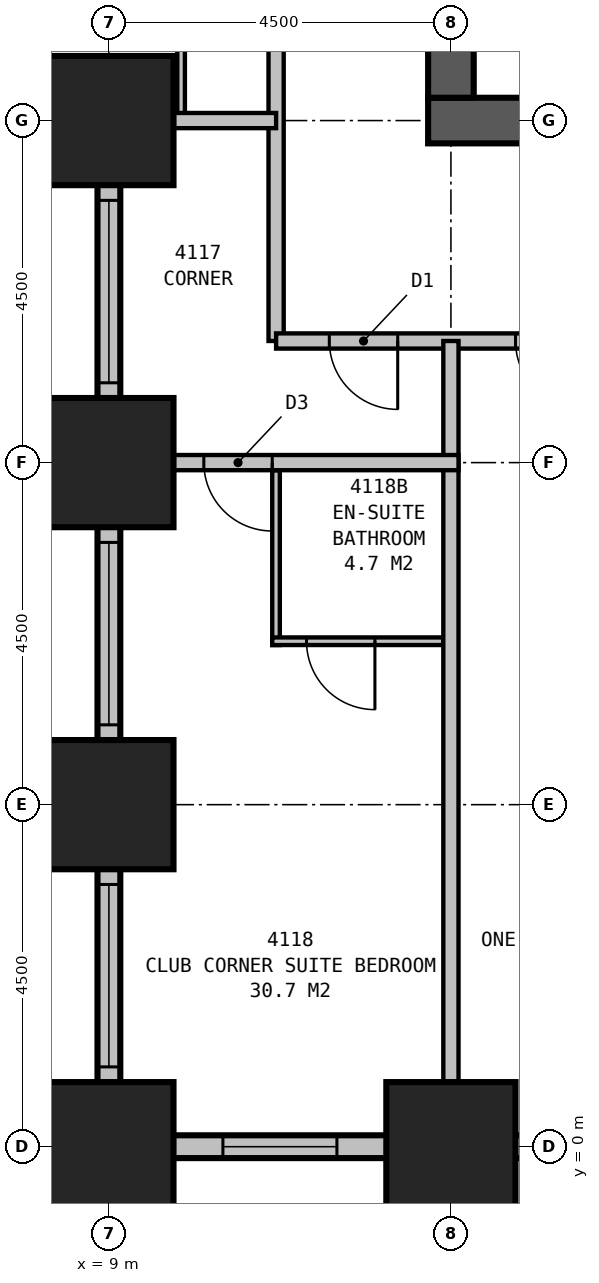
"""IFC4 building model, lengths in metres.
Left out: names, types, materials, properties, quantities, classifications, styles, units other than length and angle.
Written with IfcOpenShell. Run it as: python <this file> out.ifc"""

import sys

from ifc_helpers import new_model, si_unit, direction, frame, frame_2d, origin, origin_2d, place, context, subcontext, project, spatial, rectangle, extrude, element, fill, save


model = new_model("IFC4")
c1 = context("Model", 3, precision=1e-05, world=origin(), true_north=direction((0.0, 1.0)))
c2 = subcontext(c1, "Body", "Model", "MODEL_VIEW")
j1 = project(units=[si_unit("LENGTHUNIT", "METRE"), si_unit("PLANEANGLEUNIT", "RADIAN")], contexts=[c1])
p1 = place(None, origin())
s1 = spatial("IfcSite", under=j1, at=p1, CompositionType="ELEMENT")
p2 = place(p1, origin())
s2 = spatial("IfcBuilding", under=s1, at=p2, CompositionType="ELEMENT")
p3 = place(p2, frame((0.0, 0.0, 162.4)))
s3 = spatial("IfcBuildingStorey", under=s2, at=p3, CompositionType="ELEMENT", Elevation=162.4)
for number, where, z_axis, x_axis in (
    (1, (9.0, 13.5, 0.0), (0.0, 0.0, 1.0), (1.0, 0.0, 0.0)),
    (2, (9.0, 9.0, 0.0), (0.0, 0.0, 1.0), (1.0, 0.0, 0.0)),
    (3, (9.0, 4.5, 0.0), (0.0, 0.0, 1.0), (1.0, 0.0, 0.0)),
    (4, (9.0, 0.0, 0.0), (0.0, 0.0, 1.0), (1.0, 0.0, 0.0)),
    (5, (13.5, 0.0, 0.0), (0.0, 0.0, 1.0), (1.0, 0.0, 0.0)),
):
    element("IfcColumn", number, at=place(p3, frame(where, z_axis=z_axis, x_axis=x_axis)), inside=s3, PredefinedType="COLUMN", context=c2, shape_type="SweptSolid", body=[
        extrude(rectangle(XDim=1.7, YDim=1.7, at=origin_2d()), origin(), (0.0, 0.0, 1.0), 3.5),
    ])
p4 = place(p3, frame((13.2, 13.5, 0.0), z_axis=(0.0, 0.0, 1.0), x_axis=(1.0, 0.0, 0.0)))
e6 = element("IfcWall", 6, at=p4, inside=s3, PredefinedType="SHEAR", context=c2, shape_type="SweptSolid", body=[
    extrude(rectangle(XDim=23.1, YDim=0.6, at=frame_2d((11.55, 0.0))), origin(), (0.0, 0.0, 1.0), 3.5),
])
p5 = place(p3, frame((13.5, 16.5, 0.0), z_axis=(0.0, 0.0, 1.0), x_axis=(0.0, -1.0, 0.0)))
e7 = element("IfcWall", 7, at=p5, inside=s3, PredefinedType="SHEAR", context=c2, shape_type="SweptSolid", body=[
    extrude(rectangle(XDim=2.7, YDim=0.6, at=frame_2d((1.35, 0.0))), origin(), (0.0, 0.0, 1.0), 3.5),
])
p6 = place(p3, frame((1.35, 13.5, 0.0), z_axis=(0.0, 0.0, 1.0), x_axis=(1.0, 0.0, 0.0)))
e8 = element("IfcWall", 8, at=p6, inside=s3, PredefinedType="STANDARD", context=c2, shape_type="SweptSolid", body=[
    extrude(rectangle(XDim=7.8, YDim=0.3, at=frame_2d((3.9, 0.0))), origin(), (0.0, 0.0, 1.0), 2.0),
])
p7 = place(p6, frame((1.2, 0.0, 0.5)))
e9 = element("IfcOpeningElement", 9, at=p7, cuts=e8, PredefinedType="OPENING", context=c2, shape_type="SweptSolid", body=[
    extrude(rectangle(XDim=0.9, YDim=1.35, at=frame_2d((0.45, 0.675))), frame((0.0, 0.16, 0.0), z_axis=(0.0, -1.0, 0.0), x_axis=(1.0, 0.0, 0.0)), (0.0, 0.0, 1.0), 0.32),
])
p8 = place(p3, frame((9.0, 13.65, 0.0), z_axis=(0.0, 0.0, 1.0), x_axis=(0.0, -1.0, 0.0)))
e10 = element("IfcWall", 10, at=p8, inside=s3, PredefinedType="STANDARD", context=c2, shape_type="SweptSolid", body=[
    extrude(rectangle(XDim=13.8, YDim=0.3, at=frame_2d((6.9, 0.0))), origin(), (0.0, 0.0, 1.0), 2.0),
])
p9 = place(p8, frame((1.2, 0.0, 0.5)))
e11 = element("IfcOpeningElement", 11, at=p9, cuts=e10, PredefinedType="OPENING", context=c2, shape_type="SweptSolid", body=[
    extrude(rectangle(XDim=2.4, YDim=1.35, at=frame_2d((1.2, 0.675))), frame((0.0, 0.16, 0.0), z_axis=(0.0, -1.0, 0.0), x_axis=(1.0, 0.0, 0.0)), (0.0, 0.0, 1.0), 0.32),
])
p10 = place(p8, frame((5.7, 0.0, 0.5)))
e12 = element("IfcOpeningElement", 12, at=p10, cuts=e10, PredefinedType="OPENING", context=c2, shape_type="SweptSolid", body=[
    extrude(rectangle(XDim=2.4, YDim=1.35, at=frame_2d((1.2, 0.675))), frame((0.0, 0.16, 0.0), z_axis=(0.0, -1.0, 0.0), x_axis=(1.0, 0.0, 0.0)), (0.0, 0.0, 1.0), 0.32),
])
p11 = place(p8, frame((10.2, 0.0, 0.5)))
e13 = element("IfcOpeningElement", 13, at=p11, cuts=e10, PredefinedType="OPENING", context=c2, shape_type="SweptSolid", body=[
    extrude(rectangle(XDim=2.4, YDim=1.35, at=frame_2d((1.2, 0.675))), frame((0.0, 0.16, 0.0), z_axis=(0.0, -1.0, 0.0), x_axis=(1.0, 0.0, 0.0)), (0.0, 0.0, 1.0), 0.32),
])
p12 = place(p3, frame((8.85, 0.0, 0.0), z_axis=(0.0, 0.0, 1.0), x_axis=(1.0, 0.0, 0.0)))
e14 = element("IfcWall", 14, at=p12, inside=s3, PredefinedType="STANDARD", context=c2, shape_type="SweptSolid", body=[
    extrude(rectangle(XDim=36.3, YDim=0.3, at=frame_2d((18.15, 0.0))), origin(), (0.0, 0.0, 1.0), 2.25),
])
p13 = place(p12, frame((1.65, 0.0, 0.5)))
e15 = element("IfcOpeningElement", 15, at=p13, cuts=e14, PredefinedType="OPENING", context=c2, shape_type="SweptSolid", body=[
    extrude(rectangle(XDim=1.5, YDim=1.6, at=frame_2d((0.75, 0.8))), frame((0.0, 0.16, 0.0), z_axis=(0.0, -1.0, 0.0), x_axis=(1.0, 0.0, 0.0)), (0.0, 0.0, 1.0), 0.32),
])
p14 = place(p12, frame((5.7, 0.0, 0.5)))
e16 = element("IfcOpeningElement", 16, at=p14, cuts=e14, PredefinedType="OPENING", context=c2, shape_type="SweptSolid", body=[
    extrude(rectangle(XDim=2.4, YDim=1.6, at=frame_2d((1.2, 0.8))), frame((0.0, 0.16, 0.0), z_axis=(0.0, -1.0, 0.0), x_axis=(1.0, 0.0, 0.0)), (0.0, 0.0, 1.0), 0.32),
])
p15 = place(p12, frame((10.2, 0.0, 0.5)))
e17 = element("IfcOpeningElement", 17, at=p15, cuts=e14, PredefinedType="OPENING", context=c2, shape_type="SweptSolid", body=[
    extrude(rectangle(XDim=2.4, YDim=1.6, at=frame_2d((1.2, 0.8))), frame((0.0, 0.16, 0.0), z_axis=(0.0, -1.0, 0.0), x_axis=(1.0, 0.0, 0.0)), (0.0, 0.0, 1.0), 0.32),
])
p16 = place(p12, frame((14.7, 0.0, 0.5)))
e18 = element("IfcOpeningElement", 18, at=p16, cuts=e14, PredefinedType="OPENING", context=c2, shape_type="SweptSolid", body=[
    extrude(rectangle(XDim=2.4, YDim=1.6, at=frame_2d((1.2, 0.8))), frame((0.0, 0.16, 0.0), z_axis=(0.0, -1.0, 0.0), x_axis=(1.0, 0.0, 0.0)), (0.0, 0.0, 1.0), 0.32),
])
p17 = place(p12, frame((19.2, 0.0, 0.5)))
e19 = element("IfcOpeningElement", 19, at=p17, cuts=e14, PredefinedType="OPENING", context=c2, shape_type="SweptSolid", body=[
    extrude(rectangle(XDim=2.4, YDim=1.6, at=frame_2d((1.2, 0.8))), frame((0.0, 0.16, 0.0), z_axis=(0.0, -1.0, 0.0), x_axis=(1.0, 0.0, 0.0)), (0.0, 0.0, 1.0), 0.32),
])
p18 = place(p12, frame((23.7, 0.0, 0.5)))
e20 = element("IfcOpeningElement", 20, at=p18, cuts=e14, PredefinedType="OPENING", context=c2, shape_type="SweptSolid", body=[
    extrude(rectangle(XDim=2.4, YDim=1.6, at=frame_2d((1.2, 0.8))), frame((0.0, 0.16, 0.0), z_axis=(0.0, -1.0, 0.0), x_axis=(1.0, 0.0, 0.0)), (0.0, 0.0, 1.0), 0.32),
])
p19 = place(p12, frame((28.2, 0.0, 0.5)))
e21 = element("IfcOpeningElement", 21, at=p19, cuts=e14, PredefinedType="OPENING", context=c2, shape_type="SweptSolid", body=[
    extrude(rectangle(XDim=2.4, YDim=1.6, at=frame_2d((1.2, 0.8))), frame((0.0, 0.16, 0.0), z_axis=(0.0, -1.0, 0.0), x_axis=(1.0, 0.0, 0.0)), (0.0, 0.0, 1.0), 0.32),
])
p20 = place(p12, frame((32.7, 0.0, 0.5)))
e22 = element("IfcOpeningElement", 22, at=p20, cuts=e14, PredefinedType="OPENING", context=c2, shape_type="SweptSolid", body=[
    extrude(rectangle(XDim=2.4, YDim=1.6, at=frame_2d((1.2, 0.8))), frame((0.0, 0.16, 0.0), z_axis=(0.0, -1.0, 0.0), x_axis=(1.0, 0.0, 0.0)), (0.0, 0.0, 1.0), 0.32),
])
p21 = place(p3, frame((11.2, 10.6, 0.0), z_axis=(0.0, 0.0, 1.0), x_axis=(1.0, 0.0, 0.0)))
e23 = element("IfcWall", 23, at=p21, inside=s3, PredefinedType="PARTITIONING", context=c2, shape_type="SweptSolid", body=[
    extrude(rectangle(XDim=27.1, YDim=0.2, at=frame_2d((13.55, 0.0))), origin(), (0.0, 0.0, 1.0), 3.25),
])
p22 = place(p21, frame((4.05, 0.0, 0.0), z_axis=(0.0, 0.0, 1.0), x_axis=(-1.0, 0.0, 0.0)))
e24 = element("IfcOpeningElement", 24, at=p22, cuts=e23, PredefinedType="OPENING", context=c2, shape_type="SweptSolid", body=[
    extrude(rectangle(XDim=0.9, YDim=2.1, at=frame_2d((0.45, 1.05))), frame((0.0, 0.11, 0.0), z_axis=(0.0, -1.0, 0.0), x_axis=(1.0, 0.0, 0.0)), (0.0, 0.0, 1.0), 0.22),
])
p23 = place(p21, frame((12.65, 0.0, 0.0), z_axis=(0.0, 0.0, 1.0), x_axis=(-1.0, 0.0, 0.0)))
e25 = element("IfcOpeningElement", 25, at=p23, cuts=e23, PredefinedType="OPENING", context=c2, shape_type="SweptSolid", body=[
    extrude(rectangle(XDim=1.0, YDim=2.1, at=frame_2d((0.5, 1.05))), frame((0.0, 0.11, 0.0), z_axis=(0.0, -1.0, 0.0), x_axis=(1.0, 0.0, 0.0)), (0.0, 0.0, 1.0), 0.22),
])
p24 = place(p21, frame((17.55, 0.0, 0.0), z_axis=(0.0, 0.0, 1.0), x_axis=(-1.0, 0.0, 0.0)))
e26 = element("IfcOpeningElement", 26, at=p24, cuts=e23, PredefinedType="OPENING", context=c2, shape_type="SweptSolid", body=[
    extrude(rectangle(XDim=0.9, YDim=2.1, at=frame_2d((0.45, 1.05))), frame((0.0, 0.11, 0.0), z_axis=(0.0, -1.0, 0.0), x_axis=(1.0, 0.0, 0.0)), (0.0, 0.0, 1.0), 0.22),
])
p25 = place(p21, frame((1.6, 0.0, 0.0), z_axis=(0.0, 0.0, 1.0), x_axis=(-1.0, 0.0, 0.0)))
e27 = element("IfcOpeningElement", 27, at=p25, cuts=e23, PredefinedType="OPENING", context=c2, shape_type="SweptSolid", body=[
    extrude(rectangle(XDim=0.9, YDim=2.1, at=frame_2d((0.45, 1.05))), frame((0.0, 0.11, 0.0), z_axis=(0.0, -1.0, 0.0), x_axis=(1.0, 0.0, 0.0)), (0.0, 0.0, 1.0), 0.22),
])
p26 = place(p21, frame((26.4, 0.0, 0.0), z_axis=(0.0, 0.0, 1.0), x_axis=(-1.0, 0.0, 0.0)))
e28 = element("IfcOpeningElement", 28, at=p26, cuts=e23, PredefinedType="OPENING", context=c2, shape_type="SweptSolid", body=[
    extrude(rectangle(XDim=0.9, YDim=2.1, at=frame_2d((0.45, 1.05))), frame((0.0, 0.11, 0.0), z_axis=(0.0, -1.0, 0.0), x_axis=(1.0, 0.0, 0.0)), (0.0, 0.0, 1.0), 0.22),
])
p27 = place(p3, frame((11.2, 10.6, 0.0), z_axis=(0.0, 0.0, 1.0), x_axis=(0.0, 1.0, 0.0)))
e29 = element("IfcWall", 29, at=p27, inside=s3, PredefinedType="PARTITIONING", context=c2, shape_type="SweptSolid", body=[
    extrude(rectangle(XDim=18.7, YDim=0.2, at=frame_2d((9.35, 0.0))), origin(), (0.0, 0.0, 1.0), 3.25),
])
p28 = place(p27, frame((6.05, 0.0, 0.0)))
e30 = element("IfcOpeningElement", 30, at=p28, cuts=e29, PredefinedType="OPENING", context=c2, shape_type="SweptSolid", body=[
    extrude(rectangle(XDim=0.9, YDim=2.1, at=frame_2d((0.45, 1.05))), frame((0.0, 0.11, 0.0), z_axis=(0.0, -1.0, 0.0), x_axis=(1.0, 0.0, 0.0)), (0.0, 0.0, 1.0), 0.22),
])
p29 = place(p27, frame((10.55, 0.0, 0.0)))
e31 = element("IfcOpeningElement", 31, at=p29, cuts=e29, PredefinedType="OPENING", context=c2, shape_type="SweptSolid", body=[
    extrude(rectangle(XDim=0.9, YDim=2.1, at=frame_2d((0.45, 1.05))), frame((0.0, 0.11, 0.0), z_axis=(0.0, -1.0, 0.0), x_axis=(1.0, 0.0, 0.0)), (0.0, 0.0, 1.0), 0.22),
])
p30 = place(p27, frame((14.65, 0.0, 0.0)))
e32 = element("IfcOpeningElement", 32, at=p30, cuts=e29, PredefinedType="OPENING", context=c2, shape_type="SweptSolid", body=[
    extrude(rectangle(XDim=1.0, YDim=2.1, at=frame_2d((0.5, 1.05))), frame((0.0, 0.11, 0.0), z_axis=(0.0, -1.0, 0.0), x_axis=(1.0, 0.0, 0.0)), (0.0, 0.0, 1.0), 0.22),
])
p31 = place(p3, frame((9.95, 13.5, 0.0), z_axis=(0.0, 0.0, 1.0), x_axis=(0.0, 1.0, 0.0)))
e33 = element("IfcWall", 33, at=p31, inside=s3, PredefinedType="PLUMBINGWALL", context=c2, shape_type="SweptSolid", body=[
    extrude(rectangle(XDim=2.8, YDim=0.1, at=frame_2d((1.4, 0.0))), origin(), (0.0, 0.0, 1.0), 3.25),
])
p32 = place(p3, frame((11.2, 13.5, 0.0), z_axis=(0.0, 0.0, 1.0), x_axis=(-1.0, 0.0, 0.0)))
e34 = element("IfcWall", 34, at=p32, inside=s3, PredefinedType="PARTITIONING", context=c2, shape_type="SweptSolid", body=[
    extrude(rectangle(XDim=2.2, YDim=0.2, at=frame_2d((1.1, 0.0))), origin(), (0.0, 0.0, 1.0), 1.95),
])
p33 = place(p3, frame((13.5, 10.6, 0.0), z_axis=(0.0, 0.0, 1.0), x_axis=(0.0, -1.0, 0.0)))
e35 = element("IfcWall", 35, at=p33, inside=s3, PredefinedType="PARTITIONING", context=c2, shape_type="SweptSolid", body=[
    extrude(rectangle(XDim=10.6, YDim=0.2, at=frame_2d((5.3, 0.0))), origin(), (0.0, 0.0, 1.0), 2.25),
])
p34 = place(p3, frame((13.6, 9.0, 0.0), z_axis=(0.0, 0.0, 1.0), x_axis=(-1.0, 0.0, 0.0)))
e36 = element("IfcWall", 36, at=p34, inside=s3, PredefinedType="PARTITIONING", context=c2, shape_type="SweptSolid", body=[
    extrude(rectangle(XDim=4.6, YDim=0.2, at=frame_2d((2.3, 0.0))), origin(), (0.0, 0.0, 1.0), 3.25),
])
p35 = place(p34, frame((2.451, 0.0, 0.0)))
e37 = element("IfcOpeningElement", 37, at=p35, cuts=e36, PredefinedType="OPENING", context=c2, shape_type="SweptSolid", body=[
    extrude(rectangle(XDim=0.9, YDim=2.1, at=frame_2d((0.45, 1.05))), frame((0.0, 0.11, 0.0), z_axis=(0.0, -1.0, 0.0), x_axis=(1.0, 0.0, 0.0)), (0.0, 0.0, 1.0), 0.22),
])
p36 = place(p3, frame((11.199, 8.9, 0.0), z_axis=(0.0, 0.0, 1.0), x_axis=(0.0, -1.0, 0.0)))
e38 = element("IfcWall", 38, at=p36, inside=s3, PredefinedType="PLUMBINGWALL", context=c2, shape_type="SweptSolid", body=[
    extrude(rectangle(XDim=2.3, YDim=0.1, at=frame_2d((1.15, 0.0))), origin(), (0.0, 0.0, 1.0), 3.25),
])
p37 = place(p3, frame((13.4, 6.65, 0.0), z_axis=(0.0, 0.0, 1.0), x_axis=(-1.0, 0.0, 0.0)))
e39 = element("IfcWall", 39, at=p37, inside=s3, PredefinedType="PLUMBINGWALL", context=c2, shape_type="SweptSolid", body=[
    extrude(rectangle(XDim=2.251, YDim=0.1, at=frame_2d((1.125, 0.0))), origin(), (0.0, 0.0, 1.0), 3.25),
])
p38 = place(p37, frame((0.9, 0.0, 0.0)))
e40 = element("IfcOpeningElement", 40, at=p38, cuts=e39, PredefinedType="OPENING", context=c2, shape_type="SweptSolid", body=[
    extrude(rectangle(XDim=0.9, YDim=2.1, at=frame_2d((0.45, 1.05))), frame((0.0, 0.06, 0.0), z_axis=(0.0, -1.0, 0.0), x_axis=(1.0, 0.0, 0.0)), (0.0, 0.0, 1.0), 0.12),
])
p39 = place(p9, origin())
e41 = element("IfcWindow", 41, at=p39, inside=s3, PartitioningType="SINGLE_PANEL", PredefinedType="WINDOW", context=c2, shape_type="SweptSolid", body=[
    extrude(rectangle(XDim=2.4, YDim=1.35, at=frame_2d((1.2, 0.675))), frame((0.0, 0.03, 0.0), z_axis=(0.0, -1.0, 0.0), x_axis=(1.0, 0.0, 0.0)), (0.0, 0.0, 1.0), 0.06),
])
fill(e11, e41)
p40 = place(p10, origin())
e42 = element("IfcWindow", 42, at=p40, inside=s3, PartitioningType="SINGLE_PANEL", PredefinedType="WINDOW", context=c2, shape_type="SweptSolid", body=[
    extrude(rectangle(XDim=2.4, YDim=1.35, at=frame_2d((1.2, 0.675))), frame((0.0, 0.03, 0.0), z_axis=(0.0, -1.0, 0.0), x_axis=(1.0, 0.0, 0.0)), (0.0, 0.0, 1.0), 0.06),
])
fill(e12, e42)
p41 = place(p11, origin())
e43 = element("IfcWindow", 43, at=p41, inside=s3, PartitioningType="SINGLE_PANEL", PredefinedType="WINDOW", context=c2, shape_type="SweptSolid", body=[
    extrude(rectangle(XDim=2.4, YDim=1.35, at=frame_2d((1.2, 0.675))), frame((0.0, 0.03, 0.0), z_axis=(0.0, -1.0, 0.0), x_axis=(1.0, 0.0, 0.0)), (0.0, 0.0, 1.0), 0.06),
])
fill(e13, e43)
p42 = place(p13, origin())
e44 = element("IfcWindow", 44, at=p42, inside=s3, PartitioningType="SINGLE_PANEL", PredefinedType="WINDOW", context=c2, shape_type="SweptSolid", body=[
    extrude(rectangle(XDim=1.5, YDim=1.6, at=frame_2d((0.75, 0.8))), frame((0.0, 0.03, 0.0), z_axis=(0.0, -1.0, 0.0), x_axis=(1.0, 0.0, 0.0)), (0.0, 0.0, 1.0), 0.06),
])
fill(e15, e44)
p43 = place(p22, origin())
e45 = element("IfcDoor", 45, at=p43, inside=s3, OperationType="SINGLE_SWING_LEFT", PredefinedType="DOOR", context=c2, shape_type="SweptSolid", body=[
    extrude(rectangle(XDim=0.9, YDim=2.1, at=frame_2d((0.45, 1.05))), frame((0.0, 0.025, 0.0), z_axis=(0.0, -1.0, 0.0), x_axis=(1.0, 0.0, 0.0)), (0.0, 0.0, 1.0), 0.05),
])
fill(e24, e45)
p44 = place(p25, origin())
e46 = element("IfcDoor", 46, at=p44, inside=s3, OperationType="SINGLE_SWING_LEFT", PredefinedType="DOOR", context=c2, shape_type="SweptSolid", body=[
    extrude(rectangle(XDim=0.9, YDim=2.1, at=frame_2d((0.45, 1.05))), frame((0.0, 0.025, 0.0), z_axis=(0.0, -1.0, 0.0), x_axis=(1.0, 0.0, 0.0)), (0.0, 0.0, 1.0), 0.05),
])
fill(e27, e46)
p45 = place(p35, origin())
e47 = element("IfcDoor", 47, at=p45, inside=s3, OperationType="SINGLE_SWING_LEFT", PredefinedType="DOOR", context=c2, shape_type="SweptSolid", body=[
    extrude(rectangle(XDim=0.9, YDim=2.1, at=frame_2d((0.45, 1.05))), frame((0.0, 0.025, 0.0), z_axis=(0.0, -1.0, 0.0), x_axis=(1.0, 0.0, 0.0)), (0.0, 0.0, 1.0), 0.05),
])
fill(e37, e47)
p46 = place(p38, origin())
e48 = element("IfcDoor", 48, at=p46, inside=s3, OperationType="SINGLE_SWING_LEFT", PredefinedType="DOOR", context=c2, shape_type="SweptSolid", body=[
    extrude(rectangle(XDim=0.9, YDim=2.1, at=frame_2d((0.45, 1.05))), frame((0.0, 0.025, 0.0), z_axis=(0.0, -1.0, 0.0), x_axis=(1.0, 0.0, 0.0)), (0.0, 0.0, 1.0), 0.05),
])
fill(e40, e48)
save(model, sys.argv[1])
